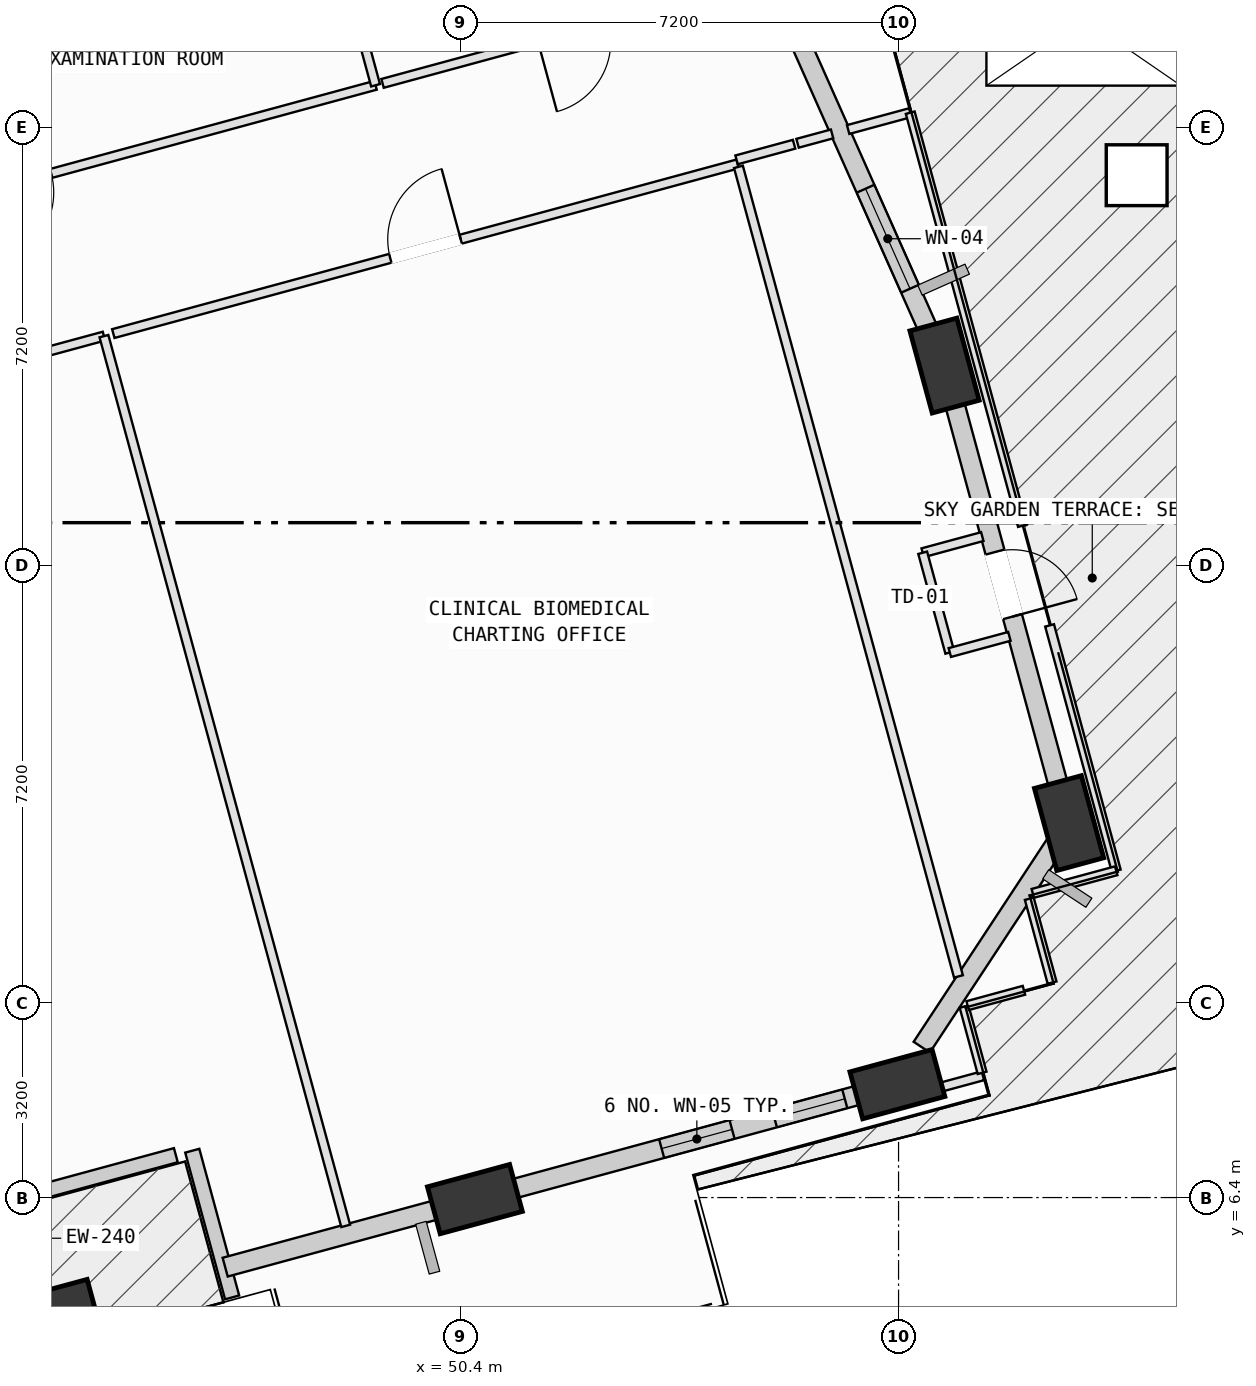
"""IFC4 building model, lengths in metres.
Left out: names, types, materials, properties, quantities, classifications, styles, units other than length and angle.
Written with IfcOpenShell. Run it as: python <this file> out.ifc"""

import sys

from ifc_helpers import new_model, si_unit, direction, frame, frame_2d, origin, origin_2d, place, context, subcontext, project, spatial, rectangle, extrude, element, fill, save


model = new_model("IFC4")
c1 = context("Model", 3, precision=1e-05, world=origin(), true_north=direction((0.0, 1.0)))
c2 = subcontext(c1, "Body", "Model", "MODEL_VIEW")
j1 = project(units=[si_unit("LENGTHUNIT", "METRE"), si_unit("PLANEANGLEUNIT", "RADIAN")], contexts=[c1])
p1 = place(None, origin())
s1 = spatial("IfcSite", under=j1, at=p1, CompositionType="ELEMENT")
p2 = place(p1, origin())
s2 = spatial("IfcBuilding", under=s1, at=p2, CompositionType="ELEMENT")
p3 = place(p2, frame((0.0, 0.0, 88.4)))
s3 = spatial("IfcBuildingStorey", under=s2, at=p3, CompositionType="ELEMENT", Elevation=88.4)
p4 = place(p3, frame((43.685, 4.484, 0.056), z_axis=(0.083481406489, 0.04229560181, 0.995611338243), x_axis=(-0.668997536394, 0.742859501733, 0.024536849522)))
e1 = element("IfcColumn", 1, at=p4, inside=s3, PredefinedType="COLUMN", context=c2, shape_type="SweptSolid", body=[
    extrude(rectangle(XDim=1.4, YDim=0.8, at=origin_2d()), origin(), (0.0, 0.0, 1.0), 3.96),
])
p5 = place(p3, frame((50.633, 6.374, 0.062), z_axis=(0.07537657007, 0.070812031457, 0.994637636974), x_axis=(-0.850808290541, 0.524776121633, 0.027115953079)))
e2 = element("IfcColumn", 2, at=p5, inside=s3, PredefinedType="COLUMN", context=c2, shape_type="SweptSolid", body=[
    extrude(rectangle(XDim=1.4, YDim=0.8, at=origin_2d()), origin(), (0.0, 0.0, 1.0), 3.958),
])
p6 = place(p3, frame((57.581, 8.265, 0.071), z_axis=(0.067267890032, 0.099235566212, 0.992787657744), x_axis=(-0.94484438457, 0.32600777038, 0.03143282678)))
e3 = element("IfcColumn", 3, at=p6, inside=s3, PredefinedType="COLUMN", context=c2, shape_type="SweptSolid", body=[
    extrude(rectangle(XDim=1.4, YDim=0.8, at=origin_2d()), origin(), (0.0, 0.0, 1.0), 3.956),
])
p7 = place(p3, frame((60.405, 12.559, 0.097), z_axis=(0.049509870039, 0.110698354341, 0.992620092037), x_axis=(-0.151744023747, -0.981467926566, 0.117023332628)))
e4 = element("IfcColumn", 4, at=p7, inside=s3, PredefinedType="COLUMN", context=c2, shape_type="SweptSolid", body=[
    extrude(rectangle(XDim=1.4, YDim=0.8, at=origin_2d()), origin(), (0.0, 0.0, 1.0), 3.93),
])
p8 = place(p3, frame((58.356, 20.084, 0.084), z_axis=(0.018608966, 0.102225253226, 0.994587202807), x_axis=(0.086055333022, -0.991231736381, 0.100270257057)))
e5 = element("IfcColumn", 5, at=p8, inside=s3, PredefinedType="COLUMN", context=c2, shape_type="SweptSolid", body=[
    extrude(rectangle(XDim=1.4, YDim=0.8, at=origin_2d()), origin(), (0.0, 0.0, 1.0), 3.936),
])
p9 = place(p3, frame((45.714, 7.097, 0.0), z_axis=(0.0, 0.0, 1.0), x_axis=(-0.96502158219, -0.262170452011, 0.0)))
e6 = element("IfcWall", 6, at=p9, inside=s3, PredefinedType="SOLIDWALL", context=c2, shape_type="SweptSolid", body=[
    extrude(rectangle(XDim=6.96, YDim=0.24, at=frame_2d((3.48, 0.0))), origin(), (0.0, 0.0, 1.0), 2.745),
])
p10 = place(p9, frame((2.93, 0.0, 0.0)))
e7 = element("IfcOpeningElement", 7, at=p10, cuts=e6, PredefinedType="OPENING", context=c2, shape_type="SweptSolid", body=[
    extrude(rectangle(XDim=1.1, YDim=2.15, at=frame_2d((0.55, 1.075))), frame((0.0, 0.13, 0.0), z_axis=(0.0, -1.0, 0.0), x_axis=(1.0, 0.0, 0.0)), (0.0, 0.0, 1.0), 0.26),
])
p11 = place(p3, frame((46.64, 4.758, 0.0), z_axis=(0.0, 0.0, 1.0), x_axis=(-0.26210915003, 0.965038234201, 0.0)))
e8 = element("IfcWall", 8, at=p11, inside=s3, PredefinedType="SOLIDWALL", context=c2, shape_type="SweptSolid", body=[
    extrude(rectangle(XDim=2.5, YDim=0.24, at=frame_2d((1.25, 0.0))), origin(), (0.0, 0.0, 1.0), 3.165),
])
p12 = place(p3, frame((50.336, 6.29, 0.0), z_axis=(0.0, 0.0, 1.0), x_axis=(-0.965017376206, -0.262185933302, 0.0)))
e9 = element("IfcWall", 9, at=p12, inside=s3, PredefinedType="SOLIDWALL", context=c2, shape_type="SweptSolid", body=[
    extrude(rectangle(XDim=3.948, YDim=0.32, at=frame_2d((1.974, 0.0))), origin(), (0.0, 0.0, 1.0), 2.745),
])
p13 = place(p3, frame((57.299, 8.182, 0.0), z_axis=(0.0, 0.0, 1.0), x_axis=(-0.965014291952, -0.262197285128, 0.0)))
e10 = element("IfcWall", 10, at=p13, inside=s3, PredefinedType="SOLIDWALL", context=c2, shape_type="SweptSolid", body=[
    extrude(rectangle(XDim=6.242, YDim=0.32, at=frame_2d((3.121, 0.0))), origin(), (0.0, 0.0, 1.0), 2.745),
])
p14 = place(p13, frame((2.525, 0.0, 0.75)))
e11 = element("IfcOpeningElement", 11, at=p14, cuts=e10, PredefinedType="OPENING", context=c2, shape_type="SweptSolid", body=[
    extrude(rectangle(XDim=1.2, YDim=1.75, at=frame_2d((0.6, 0.875))), frame((0.0, 0.17, 0.0), z_axis=(0.0, -1.0, 0.0), x_axis=(1.0, 0.0, 0.0)), (0.0, 0.0, 1.0), 0.34),
])
p15 = place(p13, frame((0.604, 0.0, 0.75)))
e12 = element("IfcOpeningElement", 12, at=p15, cuts=e10, PredefinedType="OPENING", context=c2, shape_type="SweptSolid", body=[
    extrude(rectangle(XDim=1.2, YDim=1.75, at=frame_2d((0.6, 0.875))), frame((0.0, 0.17, 0.0), z_axis=(0.0, -1.0, 0.0), x_axis=(1.0, 0.0, 0.0)), (0.0, 0.0, 1.0), 0.34),
])
p16 = place(p3, frame((60.26, 12.336, 0.0), z_axis=(0.0, 0.0, 1.0), x_axis=(-0.549770104054, -0.835316007681, 0.0)))
e13 = element("IfcWall", 13, at=p16, inside=s3, PredefinedType="SOLIDWALL", context=c2, shape_type="SweptSolid", body=[
    extrude(rectangle(XDim=4.145, YDim=0.32, at=frame_2d((2.073, 0.0))), origin(), (0.0, 0.0, 1.0), 3.165),
])
p17 = place(p3, frame((58.433, 19.786, 0.0), z_axis=(0.0, 0.0, 1.0), x_axis=(0.26220517946, -0.965012147003, 0.0)))
e14 = element("IfcWall", 14, at=p17, inside=s3, PredefinedType="SOLIDWALL", context=c2, shape_type="SweptSolid", body=[
    extrude(rectangle(XDim=6.84, YDim=0.32, at=frame_2d((3.42, 0.0))), origin(), (0.0, 0.0, 1.0), 3.165),
])
p18 = place(p17, frame((2.87, 0.0, 0.0)))
e15 = element("IfcOpeningElement", 15, at=p18, cuts=e14, PredefinedType="OPENING", context=c2, shape_type="SweptSolid", body=[
    extrude(rectangle(XDim=1.1, YDim=2.15, at=frame_2d((0.55, 1.075))), frame((0.0, 0.17, 0.0), z_axis=(0.0, -1.0, 0.0), x_axis=(1.0, 0.0, 0.0)), (0.0, 0.0, 1.0), 0.34),
])
p19 = place(p3, frame((54.495, 28.747, 0.0), z_axis=(0.0, 0.0, 1.0), x_axis=(0.406584404418, -0.913613223462, 0.0)))
e16 = element("IfcWall", 16, at=p19, inside=s3, PredefinedType="SOLIDWALL", context=c2, shape_type="SweptSolid", body=[
    extrude(rectangle(XDim=8.838, YDim=0.32, at=frame_2d((4.419, 0.0))), origin(), (0.0, 0.0, 1.0), 3.165),
])
p20 = place(p19, frame((6.299, 0.0, 0.75)))
e17 = element("IfcOpeningElement", 17, at=p20, cuts=e16, PredefinedType="OPENING", context=c2, shape_type="SweptSolid", body=[
    extrude(rectangle(XDim=1.8, YDim=2.05, at=frame_2d((0.9, 1.025))), frame((0.0, 0.17, 0.0), z_axis=(0.0, -1.0, 0.0), x_axis=(1.0, 0.0, 0.0)), (0.0, 0.0, 1.0), 0.34),
])
p21 = place(p3, frame((38.03, 18.802, 0.0), z_axis=(0.0, 0.0, 1.0), x_axis=(0.965032576147, 0.26212998107, 0.0)))
e18 = element("IfcWall", 18, at=p21, inside=s3, PredefinedType="PARTITIONING", context=c2, shape_type="SweptSolid", body=[
    extrude(rectangle(XDim=6.738, YDim=0.15, at=frame_2d((3.369, 0.0))), origin(), (0.0, 0.0, 1.0), 2.765),
])
p22 = place(p21, frame((2.769, 0.0, 0.0)))
e19 = element("IfcOpeningElement", 19, at=p22, cuts=e18, PredefinedType="OPENING", context=c2, shape_type="SweptSolid", body=[
    extrude(rectangle(XDim=1.2, YDim=2.15, at=frame_2d((0.6, 1.075))), frame((0.0, 0.085, 0.0), z_axis=(0.0, -1.0, 0.0), x_axis=(1.0, 0.0, 0.0)), (0.0, 0.0, 1.0), 0.17),
])
p23 = place(p3, frame((44.532, 20.568, 0.0), z_axis=(0.0, 0.0, 1.0), x_axis=(0.262195036903, -0.965014902799, 0.0)))
e20 = element("IfcWall", 20, at=p23, inside=s3, PredefinedType="PARTITIONING", context=c2, shape_type="SweptSolid", body=[
    extrude(rectangle(XDim=15.165, YDim=0.15, at=frame_2d((7.582, 0.0))), origin(), (0.0, 0.0, 1.0), 3.78),
])
p24 = place(p3, frame((58.987, 8.403, 0.0), z_axis=(0.0, 0.0, 1.0), x_axis=(-0.965050434137, -0.262064227953, 0.0)))
e21 = element("IfcWall", 21, at=p24, inside=s3, PredefinedType="PARTITIONING", context=c2, shape_type="SweptSolid", body=[
    extrude(rectangle(XDim=1.687, YDim=0.15, at=frame_2d((0.844, 0.0))), origin(), (0.0, 0.0, 1.0), 3.78),
])
p25 = place(p3, frame((51.335, 6.323, 0.0), z_axis=(0.0, 0.0, 1.0), x_axis=(-0.965075837015, -0.261970664026, 0.0)))
e22 = element("IfcWall", 22, at=p25, inside=s3, PredefinedType="PARTITIONING", context=c2, shape_type="SweptSolid", body=[
    extrude(rectangle(XDim=0.973, YDim=0.15, at=frame_2d((0.486, 0.0))), origin(), (0.0, 0.0, 1.0), 2.745),
])
p26 = place(p3, frame((44.686, 20.61, 0.0), z_axis=(0.0, 0.0, 1.0), x_axis=(0.965015946981, 0.262191193736, 0.0)))
e23 = element("IfcWall", 23, at=p26, inside=s3, PredefinedType="PARTITIONING", context=c2, shape_type="SweptSolid", body=[
    extrude(rectangle(XDim=10.64, YDim=0.15, at=frame_2d((5.32, 0.0))), origin(), (0.0, 0.0, 1.0), 3.78),
])
p27 = place(p26, frame((4.72, 0.0, 0.0)))
e24 = element("IfcOpeningElement", 24, at=p27, cuts=e23, PredefinedType="OPENING", context=c2, shape_type="SweptSolid", body=[
    extrude(rectangle(XDim=1.2, YDim=2.15, at=frame_2d((0.6, 1.075))), frame((0.0, 0.085, 0.0), z_axis=(0.0, -1.0, 0.0), x_axis=(1.0, 0.0, 0.0)), (0.0, 0.0, 1.0), 0.17),
])
p28 = place(p3, frame((54.967, 23.352, 0.0), z_axis=(0.0, 0.0, 1.0), x_axis=(0.262211478989, -0.965010435325, 0.0)))
e25 = element("IfcWall", 25, at=p28, inside=s3, PredefinedType="PARTITIONING", context=c2, shape_type="SweptSolid", body=[
    extrude(rectangle(XDim=13.798, YDim=0.15, at=frame_2d((6.899, 0.0))), origin(), (0.0, 0.0, 1.0), 3.78),
])
p29 = place(p3, frame((58.678, 9.541, 0.0), z_axis=(0.0, 0.0, 1.0), x_axis=(0.262166303741, -0.965022709154, 0.0)))
e26 = element("IfcWall", 26, at=p29, inside=s3, PredefinedType="PARTITIONING", context=c2, shape_type="SweptSolid", body=[
    extrude(rectangle(XDim=1.13, YDim=0.15, at=frame_2d((0.565, 0.0))), origin(), (0.0, 0.0, 1.0), 3.78),
])
p30 = place(p3, frame((48.999, 24.694, 0.0), z_axis=(0.0, 0.0, 1.0), x_axis=(-0.965006566945, -0.262225715279, 0.0)))
e27 = element("IfcWall", 27, at=p30, inside=s3, PredefinedType="PARTITIONING", context=c2, shape_type="SweptSolid", body=[
    extrude(rectangle(XDim=12.257, YDim=0.15, at=frame_2d((6.128, 0.0))), origin(), (0.0, 0.0, 1.0), 2.765),
])
p31 = place(p30, frame((5.528, 0.0, 0.0)))
e28 = element("IfcOpeningElement", 28, at=p31, cuts=e27, PredefinedType="OPENING", context=c2, shape_type="SweptSolid", body=[
    extrude(rectangle(XDim=1.2, YDim=2.15, at=frame_2d((0.6, 1.075))), frame((0.0, 0.085, 0.0), z_axis=(0.0, -1.0, 0.0), x_axis=(1.0, 0.0, 0.0)), (0.0, 0.0, 1.0), 0.17),
])
p32 = place(p3, frame((36.296, 24.703, 0.0), z_axis=(0.0, 0.0, 1.0), x_axis=(0.965001087771, 0.262245878138, 0.0)))
e29 = element("IfcWall", 29, at=p32, inside=s3, PredefinedType="PARTITIONING", context=c2, shape_type="SweptSolid", body=[
    extrude(rectangle(XDim=12.256, YDim=0.15, at=frame_2d((6.128, 0.0))), origin(), (0.0, 0.0, 1.0), 3.165),
])
p33 = place(p3, frame((48.123, 27.917, 0.0), z_axis=(0.0, 0.0, 1.0), x_axis=(0.262282281964, -0.964991194036, 0.0)))
e30 = element("IfcWall", 30, at=p33, inside=s3, PredefinedType="PARTITIONING", context=c2, shape_type="SweptSolid", body=[
    extrude(rectangle(XDim=3.34, YDim=0.15, at=frame_2d((1.67, 0.0))), origin(), (0.0, 0.0, 1.0), 3.78),
])
p34 = place(p3, frame((55.38, 26.427, 0.0), z_axis=(0.0, 0.0, 1.0), x_axis=(-0.965035768329, -0.262118228756, 0.0)))
e31 = element("IfcWall", 31, at=p34, inside=s3, PredefinedType="PARTITIONING", context=c2, shape_type="SweptSolid", body=[
    extrude(rectangle(XDim=6.493, YDim=0.15, at=frame_2d((3.247, 0.0))), origin(), (0.0, 0.0, 1.0), 3.78),
])
p35 = place(p34, frame((2.646, 0.0, 0.0)))
e32 = element("IfcOpeningElement", 32, at=p35, cuts=e31, PredefinedType="OPENING", context=c2, shape_type="SweptSolid", body=[
    extrude(rectangle(XDim=1.2, YDim=2.15, at=frame_2d((0.6, 1.075))), frame((0.0, 0.085, 0.0), z_axis=(0.0, -1.0, 0.0), x_axis=(1.0, 0.0, 0.0)), (0.0, 0.0, 1.0), 0.17),
])
p36 = place(p3, frame((54.936, 23.467, 0.0), z_axis=(0.0, 0.0, 1.0), x_axis=(0.965004786222, 0.262232268359, 0.0)))
e33 = element("IfcWall", 33, at=p36, inside=s3, PredefinedType="PARTITIONING", context=c2, shape_type="SweptSolid", body=[
    extrude(rectangle(XDim=0.98, YDim=0.15, at=frame_2d((0.49, 0.0))), origin(), (0.0, 0.0, 1.0), 3.78),
])
p37 = place(p3, frame((59.662, 9.809, 0.0), z_axis=(0.0, 0.0, 1.0), x_axis=(-0.964857684142, -0.262772999662, 0.0)))
e34 = element("IfcWall", 34, at=p37, inside=s3, PredefinedType="PARTITIONING", context=c2, shape_type="SweptSolid", body=[
    extrude(rectangle(XDim=0.96, YDim=0.15, at=frame_2d((0.48, 0.0))), origin(), (0.0, 0.0, 1.0), 3.78),
])
p38 = place(p3, frame((55.939, 23.74, 0.0), z_axis=(0.0, 0.0, 1.0), x_axis=(0.965145654962, 0.261713325432, 0.0)))
e35 = element("IfcWall", 35, at=p38, inside=s3, PredefinedType="PARTITIONING", context=c2, shape_type="SweptSolid", body=[
    extrude(rectangle(XDim=0.589, YDim=0.15, at=frame_2d((0.294, 0.0))), origin(), (0.0, 0.0, 1.0), 3.78),
])
p39 = place(p3, frame((56.771, 23.966, 0.0), z_axis=(0.0, 0.0, 1.0), x_axis=(0.965146256192, 0.261711108207, 0.0)))
e36 = element("IfcWall", 36, at=p39, inside=s3, PredefinedType="PARTITIONING", context=c2, shape_type="SweptSolid", body=[
    extrude(rectangle(XDim=1.058, YDim=0.15, at=frame_2d((0.529, 0.0))), origin(), (0.0, 0.0, 1.0), 3.78),
])
p40 = place(p3, frame((57.792, 24.243, 0.0), z_axis=(0.0, 0.0, 1.0), x_axis=(0.26223396033, -0.965004326441, 0.0)))
e37 = element("IfcWall", 37, at=p40, inside=s3, PredefinedType="PARTITIONING", context=c2, shape_type="SweptSolid", body=[
    extrude(rectangle(XDim=7.039, YDim=0.15, at=frame_2d((3.52, 0.0))), origin(), (0.0, 0.0, 1.0), 3.165),
])
p41 = place(p3, frame((58.977, 17.271, 0.0), z_axis=(0.0, 0.0, 1.0), x_axis=(-0.965051747028, -0.262059393189, 0.0)))
e38 = element("IfcWall", 38, at=p41, inside=s3, PredefinedType="PARTITIONING", context=c2, shape_type="SweptSolid", body=[
    extrude(rectangle(XDim=1.015, YDim=0.15, at=frame_2d((0.508, 0.0))), origin(), (0.0, 0.0, 1.0), 3.78),
])
p42 = place(p3, frame((57.997, 17.005, 0.0), z_axis=(0.0, 0.0, 1.0), x_axis=(0.26231549164, -0.964982167113, 0.0)))
e39 = element("IfcWall", 39, at=p42, inside=s3, PredefinedType="PARTITIONING", context=c2, shape_type="SweptSolid", body=[
    extrude(rectangle(XDim=1.7, YDim=0.15, at=frame_2d((0.85, 0.0))), origin(), (0.0, 0.0, 1.0), 3.78),
])
p43 = place(p3, frame((58.443, 15.364, 0.0), z_axis=(0.0, 0.0, 1.0), x_axis=(0.965112527676, 0.261835461544, 0.0)))
e40 = element("IfcWall", 40, at=p43, inside=s3, PredefinedType="PARTITIONING", context=c2, shape_type="SweptSolid", body=[
    extrude(rectangle(XDim=1.015, YDim=0.15, at=frame_2d((0.508, 0.0))), origin(), (0.0, 0.0, 1.0), 3.78),
])
p44 = place(p3, frame((60.084, 15.81, 0.0), z_axis=(0.0, 0.0, 1.0), x_axis=(0.262104450795, -0.965039510524, 0.0)))
e41 = element("IfcWall", 41, at=p44, inside=s3, PredefinedType="PARTITIONING", context=c2, shape_type="SweptSolid", body=[
    extrude(rectangle(XDim=4.181, YDim=0.15, at=frame_2d((2.091, 0.0))), origin(), (0.0, 0.0, 1.0), 3.165),
])
p45 = place(p3, frame((61.18, 11.775, 0.0), z_axis=(0.0, 0.0, 1.0), x_axis=(-0.965174884764, -0.261605508008, 0.0)))
e42 = element("IfcWall", 42, at=p45, inside=s3, PredefinedType="PARTITIONING", context=c2, shape_type="SweptSolid", body=[
    extrude(rectangle(XDim=1.421, YDim=0.15, at=frame_2d((0.711, 0.0))), origin(), (0.0, 0.0, 1.0), 3.78),
])
p46 = place(p3, frame((59.75, 11.315, 0.0), z_axis=(0.0, 0.0, 1.0), x_axis=(0.262250486085, -0.964999835517, 0.0)))
e43 = element("IfcWall", 43, at=p46, inside=s3, PredefinedType="PARTITIONING", context=c2, shape_type="SweptSolid", body=[
    extrude(rectangle(XDim=1.43, YDim=0.15, at=frame_2d((0.715, 0.0))), origin(), (0.0, 0.0, 1.0), 3.78),
])
p47 = place(p18, origin())
e44 = element("IfcDoor", 44, at=p47, inside=s3, OperationType="SINGLE_SWING_RIGHT", PredefinedType="DOOR", context=c2, shape_type="SweptSolid", body=[
    extrude(rectangle(XDim=1.1, YDim=2.15, at=frame_2d((0.55, 1.075))), frame((0.0, 0.025, 0.0), z_axis=(0.0, -1.0, 0.0), x_axis=(1.0, 0.0, 0.0)), (0.0, 0.0, 1.0), 0.05),
])
fill(e15, e44)
p48 = place(p3, frame((0.0, 0.0, -0.24)))
p49 = place(p48, frame((60.645, 25.788, 0.0)))
p50 = place(p49, frame((0.0, 0.0, 0.2)))
e45 = element("IfcWindow", 45, at=p50, inside=s3, PartitioningType="SINGLE_PANEL", PredefinedType="SKYLIGHT", context=c2, shape_type="SweptSolid", body=[
    extrude(rectangle(XDim=3.2, YDim=2.2, at=origin_2d()), origin(), (0.0, 0.0, 1.0), 0.04),
])
p51 = place(p48, frame((61.516, 23.215, 0.0)))
p52 = place(p51, frame((0.0, 0.0, 0.2)))
e46 = element("IfcDoor", 46, at=p52, inside=s3, OperationType="SINGLE_SWING_LEFT", PredefinedType="TRAPDOOR", context=c2, shape_type="SweptSolid", body=[
    extrude(rectangle(XDim=1.0, YDim=1.0, at=origin_2d()), origin(), (0.0, 0.0, 1.0), 0.04),
])
p53 = place(p14, origin())
e47 = element("IfcWindow", 47, at=p53, inside=s3, PartitioningType="SINGLE_PANEL", PredefinedType="WINDOW", context=c2, shape_type="SweptSolid", body=[
    extrude(rectangle(XDim=1.2, YDim=1.75, at=frame_2d((0.6, 0.875))), frame((0.0, 0.03, 0.0), z_axis=(0.0, -1.0, 0.0), x_axis=(1.0, 0.0, 0.0)), (0.0, 0.0, 1.0), 0.06),
])
fill(e11, e47)
p54 = place(p15, origin())
e48 = element("IfcWindow", 48, at=p54, inside=s3, PartitioningType="SINGLE_PANEL", PredefinedType="WINDOW", context=c2, shape_type="SweptSolid", body=[
    extrude(rectangle(XDim=1.2, YDim=1.75, at=frame_2d((0.6, 0.875))), frame((0.0, 0.03, 0.0), z_axis=(0.0, -1.0, 0.0), x_axis=(1.0, 0.0, 0.0)), (0.0, 0.0, 1.0), 0.06),
])
fill(e12, e48)
p55 = place(p20, origin())
e49 = element("IfcWindow", 49, at=p55, inside=s3, PartitioningType="SINGLE_PANEL", PredefinedType="WINDOW", context=c2, shape_type="SweptSolid", body=[
    extrude(rectangle(XDim=1.8, YDim=2.05, at=frame_2d((0.9, 1.025))), frame((0.0, 0.03, 0.0), z_axis=(0.0, -1.0, 0.0), x_axis=(1.0, 0.0, 0.0)), (0.0, 0.0, 1.0), 0.06),
])
fill(e17, e49)
p56 = place(p27, origin())
e50 = element("IfcDoor", 50, at=p56, inside=s3, OperationType="SINGLE_SWING_RIGHT", PredefinedType="DOOR", context=c2, shape_type="SweptSolid", body=[
    extrude(rectangle(XDim=1.2, YDim=2.15, at=frame_2d((0.6, 1.075))), frame((0.0, 0.025, 0.0), z_axis=(0.0, -1.0, 0.0), x_axis=(1.0, 0.0, 0.0)), (0.0, 0.0, 1.0), 0.05),
])
fill(e24, e50)
save(model, sys.argv[1])
